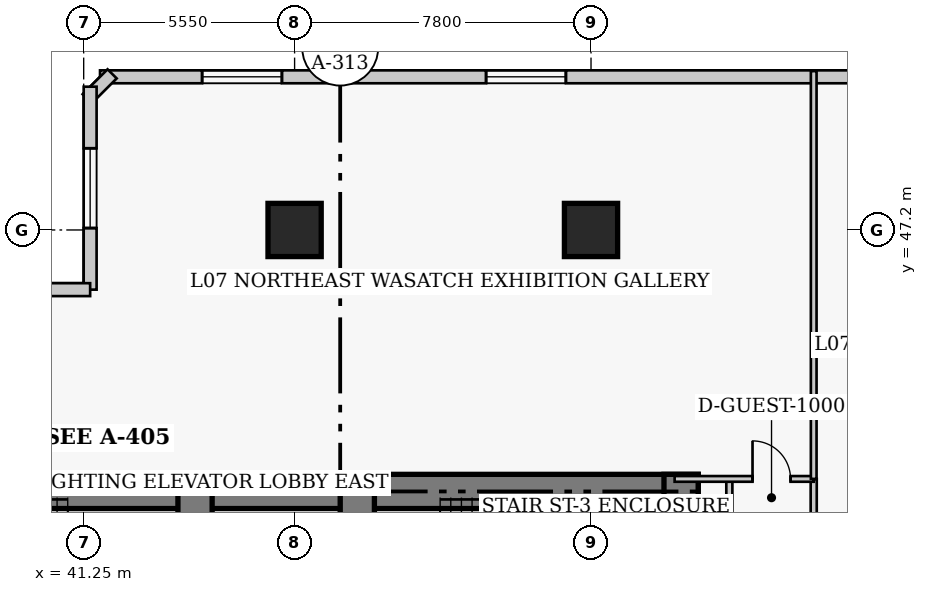
"""IFC4 building model, lengths in metres.
Left out: names, types, materials, properties, quantities, classifications, styles, units other than length and angle.
Written with IfcOpenShell. Run it as: python <this file> out.ifc"""

import sys

from ifc_helpers import new_model, si_unit, direction, frame, frame_2d, origin, origin_2d, place, context, subcontext, project, spatial, rectangle, extrude, element, fill, save


model = new_model("IFC4")
c1 = context("Model", 3, precision=1e-05, world=origin(), true_north=direction((0.0, 1.0)))
c2 = subcontext(c1, "Body", "Model", "MODEL_VIEW")
j1 = project(units=[si_unit("LENGTHUNIT", "METRE"), si_unit("PLANEANGLEUNIT", "RADIAN")], contexts=[c1])
p1 = place(None, origin())
s1 = spatial("IfcSite", under=j1, at=p1, CompositionType="ELEMENT")
p2 = place(p1, origin())
s2 = spatial("IfcBuilding", under=s1, at=p2, CompositionType="ELEMENT")
p3 = place(p2, frame((0.0, 0.0, 33.6)))
s3 = spatial("IfcBuildingStorey", under=s2, at=p3, CompositionType="ELEMENT", Elevation=33.6)
p4 = place(p3, frame((35.85, 40.32, 0.0), z_axis=(0.0, 0.0, 1.0), x_axis=(1.0, 0.0, 0.0)))
e1 = element("IfcWall", 1, at=p4, inside=s3, PredefinedType="SHEAR", context=c2, shape_type="SweptSolid", body=[
    extrude(rectangle(XDim=12.6, YDim=0.9, at=frame_2d((6.3, 0.0))), origin(), (0.0, 0.0, 1.0), 3.8),
])
p5 = place(p3, frame((48.45, 40.32, 0.0), z_axis=(0.0, 0.0, 1.0), x_axis=(1.0, 0.0, 0.0)))
e2 = element("IfcWall", 2, at=p5, inside=s3, PredefinedType="SHEAR", context=c2, shape_type="SweptSolid", body=[
    extrude(rectangle(XDim=8.97, YDim=0.9, at=frame_2d((4.485, 0.0))), origin(), (0.0, 0.0, 1.0), 3.8),
])
p6 = place(p3, frame((56.97, 27.05, 0.0), z_axis=(0.0, 0.0, 1.0), x_axis=(0.0, 1.0, 0.0)))
e3 = element("IfcWall", 3, at=p6, inside=s3, PredefinedType="SHEAR", context=c2, shape_type="SweptSolid", body=[
    extrude(rectangle(XDim=13.72, YDim=0.9, at=frame_2d((6.86, 0.0))), origin(), (0.0, 0.0, 1.0), 3.8),
])
p7 = place(p3, frame((44.18, 36.37, 0.0), z_axis=(0.0, 0.0, 1.0), x_axis=(0.0, 1.0, 0.0)))
e4 = element("IfcWall", 4, at=p7, inside=s3, PredefinedType="SHEAR", context=c2, shape_type="SweptSolid", body=[
    extrude(rectangle(XDim=3.95, YDim=0.9, at=frame_2d((1.975, 0.0))), origin(), (0.0, 0.0, 1.0), 3.8),
])
p8 = place(p3, frame((48.45, 32.3, 0.0), z_axis=(0.0, 0.0, 1.0), x_axis=(0.0, 1.0, 0.0)))
e5 = element("IfcWall", 5, at=p8, inside=s3, PredefinedType="SHEAR", context=c2, shape_type="SweptSolid", body=[
    extrude(rectangle(XDim=8.02, YDim=0.9, at=frame_2d((4.01, 0.0))), origin(), (0.0, 0.0, 1.0), 3.8),
])
p9 = place(p8, frame((5.9, 0.0, 0.0)))
e6 = element("IfcOpeningElement", 6, at=p9, cuts=e5, PredefinedType="OPENING", context=c2, shape_type="SweptSolid", body=[
    extrude(rectangle(XDim=1.1, YDim=2.15, at=frame_2d((0.55, 1.075))), frame((0.0, 0.46, 0.0), z_axis=(0.0, -1.0, 0.0), x_axis=(1.0, 0.0, 0.0)), (0.0, 0.0, 1.0), 0.92),
])
for number, where, z_axis, x_axis in (
    (7, (46.8, 47.2, 0.0), (0.0, 0.0, 1.0), (1.0, 0.0, 0.0)),
    (8, (54.6, 47.2, 0.0), (0.0, 0.0, 1.0), (1.0, 0.0, 0.0)),
):
    element("IfcColumn", number, at=place(p3, frame(where, z_axis=z_axis, x_axis=x_axis)), inside=s3, PredefinedType="COLUMN", context=c2, shape_type="SweptSolid", body=[
        extrude(rectangle(XDim=1.4, YDim=1.4, at=origin_2d()), origin(), (0.0, 0.0, 1.0), 3.8),
    ])
p10 = place(p3, frame((71.57, 51.23, 0.0), z_axis=(0.0, 0.0, 1.0), x_axis=(-1.0, 0.0, 0.0)))
e9 = element("IfcWall", 9, at=p10, inside=s3, PredefinedType="SOLIDWALL", context=c2, shape_type="SweptSolid", body=[
    extrude(rectangle(XDim=29.89, YDim=0.34, at=frame_2d((14.945, 0.0))), origin(), (0.0, 0.0, 1.0), 3.54),
])
p11 = place(p10, frame((2.686, 0.0, 0.85)))
e10 = element("IfcOpeningElement", 10, at=p11, cuts=e9, PredefinedType="OPENING", context=c2, shape_type="SweptSolid", body=[
    extrude(rectangle(XDim=2.1, YDim=1.85, at=frame_2d((1.05, 0.925))), frame((0.0, 0.18, 0.0), z_axis=(0.0, -1.0, 0.0), x_axis=(1.0, 0.0, 0.0)), (0.0, 0.0, 1.0), 0.36),
])
p12 = place(p10, frame((17.631, 0.0, 0.85)))
e11 = element("IfcOpeningElement", 11, at=p12, cuts=e9, PredefinedType="OPENING", context=c2, shape_type="SweptSolid", body=[
    extrude(rectangle(XDim=2.1, YDim=1.85, at=frame_2d((1.05, 0.925))), frame((0.0, 0.18, 0.0), z_axis=(0.0, -1.0, 0.0), x_axis=(1.0, 0.0, 0.0)), (0.0, 0.0, 1.0), 0.36),
])
p13 = place(p10, frame((25.104, 0.0, 0.85)))
e12 = element("IfcOpeningElement", 12, at=p13, cuts=e9, PredefinedType="OPENING", context=c2, shape_type="SweptSolid", body=[
    extrude(rectangle(XDim=2.1, YDim=1.85, at=frame_2d((1.05, 0.925))), frame((0.0, 0.18, 0.0), z_axis=(0.0, -1.0, 0.0), x_axis=(1.0, 0.0, 0.0)), (0.0, 0.0, 1.0), 0.36),
])
p14 = place(p3, frame((41.999, 51.308, 0.0), z_axis=(0.0, 0.0, 1.0), x_axis=(-0.707238225886, -0.706975312048, 0.0)))
e13 = element("IfcWall", 13, at=p14, inside=s3, PredefinedType="SOLIDWALL", context=c2, shape_type="SweptSolid", body=[
    extrude(rectangle(XDim=0.929, YDim=0.34, at=frame_2d((0.464, 0.0))), origin(), (0.0, 0.0, 1.0), 3.54),
])
p15 = place(p3, frame((41.42, 50.97, 0.0), z_axis=(0.0, 0.0, 1.0), x_axis=(0.0, -1.0, 0.0)))
e14 = element("IfcWall", 14, at=p15, inside=s3, PredefinedType="SOLIDWALL", context=c2, shape_type="SweptSolid", body=[
    extrude(rectangle(XDim=5.34, YDim=0.34, at=frame_2d((2.67, 0.0))), origin(), (0.0, 0.0, 1.0), 3.54),
])
p16 = place(p15, frame((1.62, 0.0, 0.85)))
e15 = element("IfcOpeningElement", 15, at=p16, cuts=e14, PredefinedType="OPENING", context=c2, shape_type="SweptSolid", body=[
    extrude(rectangle(XDim=2.1, YDim=1.85, at=frame_2d((1.05, 0.925))), frame((0.0, 0.18, 0.0), z_axis=(0.0, -1.0, 0.0), x_axis=(1.0, 0.0, 0.0)), (0.0, 0.0, 1.0), 0.36),
])
p17 = place(p3, frame((41.42, 45.63, 0.0), z_axis=(0.0, 0.0, 1.0), x_axis=(-1.0, 0.0, 0.0)))
e16 = element("IfcWall", 16, at=p17, inside=s3, PredefinedType="SOLIDWALL", context=c2, shape_type="SweptSolid", body=[
    extrude(rectangle(XDim=4.84, YDim=0.34, at=frame_2d((2.42, 0.0))), origin(), (0.0, 0.0, 1.0), 3.54),
])
p18 = place(p17, frame((1.37, 0.0, 0.85)))
e17 = element("IfcOpeningElement", 17, at=p18, cuts=e16, PredefinedType="OPENING", context=c2, shape_type="SweptSolid", body=[
    extrude(rectangle(XDim=2.1, YDim=1.85, at=frame_2d((1.05, 0.925))), frame((0.0, 0.18, 0.0), z_axis=(0.0, -1.0, 0.0), x_axis=(1.0, 0.0, 0.0)), (0.0, 0.0, 1.0), 0.36),
])
p19 = place(p3, frame((60.46, 10.25, 0.0), z_axis=(0.0, 0.0, 1.0), x_axis=(0.0, 1.0, 0.0)))
e18 = element("IfcWall", 18, at=p19, inside=s3, PredefinedType="PARTITIONING", context=c2, shape_type="SweptSolid", body=[
    extrude(rectangle(XDim=30.4, YDim=0.16, at=frame_2d((15.2, 0.0))), origin(), (0.0, 0.0, 1.0), 3.54),
])
p20 = place(p19, frame((4.4, 0.0, 0.0)))
e19 = element("IfcOpeningElement", 19, at=p20, cuts=e18, PredefinedType="OPENING", context=c2, shape_type="SweptSolid", body=[
    extrude(rectangle(XDim=0.95, YDim=2.1, at=frame_2d((0.475, 1.05))), frame((0.0, 0.09, 0.0), z_axis=(0.0, -1.0, 0.0), x_axis=(1.0, 0.0, 0.0)), (0.0, 0.0, 1.0), 0.18),
])
p21 = place(p19, frame((13.675, 0.0, 0.0)))
e20 = element("IfcOpeningElement", 20, at=p21, cuts=e18, PredefinedType="OPENING", context=c2, shape_type="SweptSolid", body=[
    extrude(rectangle(XDim=0.95, YDim=2.1, at=frame_2d((0.475, 1.05))), frame((0.0, 0.09, 0.0), z_axis=(0.0, -1.0, 0.0), x_axis=(1.0, 0.0, 0.0)), (0.0, 0.0, 1.0), 0.18),
])
p22 = place(p19, frame((21.475, 0.0, 0.0)))
e21 = element("IfcOpeningElement", 21, at=p22, cuts=e18, PredefinedType="OPENING", context=c2, shape_type="SweptSolid", body=[
    extrude(rectangle(XDim=0.95, YDim=2.1, at=frame_2d((0.475, 1.05))), frame((0.0, 0.09, 0.0), z_axis=(0.0, -1.0, 0.0), x_axis=(1.0, 0.0, 0.0)), (0.0, 0.0, 1.0), 0.18),
])
p23 = place(p19, frame((25.9, 0.0, 0.0)))
e22 = element("IfcOpeningElement", 22, at=p23, cuts=e18, PredefinedType="OPENING", context=c2, shape_type="SweptSolid", body=[
    extrude(rectangle(XDim=1.0, YDim=2.15, at=frame_2d((0.5, 1.075))), frame((0.0, 0.09, 0.0), z_axis=(0.0, -1.0, 0.0), x_axis=(1.0, 0.0, 0.0)), (0.0, 0.0, 1.0), 0.18),
])
p24 = place(p3, frame((58.24, 24.71, 0.0), z_axis=(0.0, 0.0, 1.0), x_axis=(0.0, 1.0, 0.0)))
e23 = element("IfcWall", 23, at=p24, inside=s3, PredefinedType="PARTITIONING", context=c2, shape_type="SweptSolid", body=[
    extrude(rectangle(XDim=15.94, YDim=0.16, at=frame_2d((7.97, 0.0))), origin(), (0.0, 0.0, 1.0), 3.54),
])
p25 = place(p3, frame((56.8, 40.65, 0.0), z_axis=(0.0, 0.0, 1.0), x_axis=(1.0, 0.0, 0.0)))
e24 = element("IfcWall", 24, at=p25, inside=s3, PredefinedType="PARTITIONING", context=c2, shape_type="SweptSolid", body=[
    extrude(rectangle(XDim=3.66, YDim=0.15, at=frame_2d((1.83, 0.0))), origin(), (0.0, 0.0, 1.0), 3.54),
])
p26 = place(p25, frame((2.05, 0.0, 0.0)))
e25 = element("IfcOpeningElement", 25, at=p26, cuts=e24, PredefinedType="OPENING", context=c2, shape_type="SweptSolid", body=[
    extrude(rectangle(XDim=1.0, YDim=2.15, at=frame_2d((0.5, 1.075))), frame((0.0, 0.085, 0.0), z_axis=(0.0, -1.0, 0.0), x_axis=(1.0, 0.0, 0.0)), (0.0, 0.0, 1.0), 0.17),
])
p27 = place(p3, frame((60.46, 40.65, 0.0), z_axis=(0.0, 0.0, 1.0), x_axis=(0.0, 1.0, 0.0)))
e26 = element("IfcWall", 26, at=p27, inside=s3, PredefinedType="PARTITIONING", context=c2, shape_type="SweptSolid", body=[
    extrude(rectangle(XDim=10.73, YDim=0.15, at=frame_2d((5.365, 0.0))), origin(), (0.0, 0.0, 1.0), 3.54),
])
p28 = place(p12, origin())
e27 = element("IfcWindow", 27, at=p28, inside=s3, PartitioningType="SINGLE_PANEL", PredefinedType="WINDOW", context=c2, shape_type="SweptSolid", body=[
    extrude(rectangle(XDim=2.1, YDim=1.85, at=frame_2d((1.05, 0.925))), frame((0.0, 0.03, 0.0), z_axis=(0.0, -1.0, 0.0), x_axis=(1.0, 0.0, 0.0)), (0.0, 0.0, 1.0), 0.06),
])
fill(e11, e27)
p29 = place(p13, origin())
e28 = element("IfcWindow", 28, at=p29, inside=s3, PartitioningType="SINGLE_PANEL", PredefinedType="WINDOW", context=c2, shape_type="SweptSolid", body=[
    extrude(rectangle(XDim=2.1, YDim=1.85, at=frame_2d((1.05, 0.925))), frame((0.0, 0.03, 0.0), z_axis=(0.0, -1.0, 0.0), x_axis=(1.0, 0.0, 0.0)), (0.0, 0.0, 1.0), 0.06),
])
fill(e12, e28)
p30 = place(p16, origin())
e29 = element("IfcWindow", 29, at=p30, inside=s3, PartitioningType="SINGLE_PANEL", PredefinedType="WINDOW", context=c2, shape_type="SweptSolid", body=[
    extrude(rectangle(XDim=2.1, YDim=1.85, at=frame_2d((1.05, 0.925))), frame((0.0, 0.03, 0.0), z_axis=(0.0, -1.0, 0.0), x_axis=(1.0, 0.0, 0.0)), (0.0, 0.0, 1.0), 0.06),
])
fill(e15, e29)
p31 = place(p26, origin())
e30 = element("IfcDoor", 30, at=p31, inside=s3, OperationType="SINGLE_SWING_LEFT", PredefinedType="DOOR", context=c2, shape_type="SweptSolid", body=[
    extrude(rectangle(XDim=1.0, YDim=2.15, at=frame_2d((0.5, 1.075))), frame((0.0, 0.025, 0.0), z_axis=(0.0, -1.0, 0.0), x_axis=(1.0, 0.0, 0.0)), (0.0, 0.0, 1.0), 0.05),
])
fill(e25, e30)
save(model, sys.argv[1])
